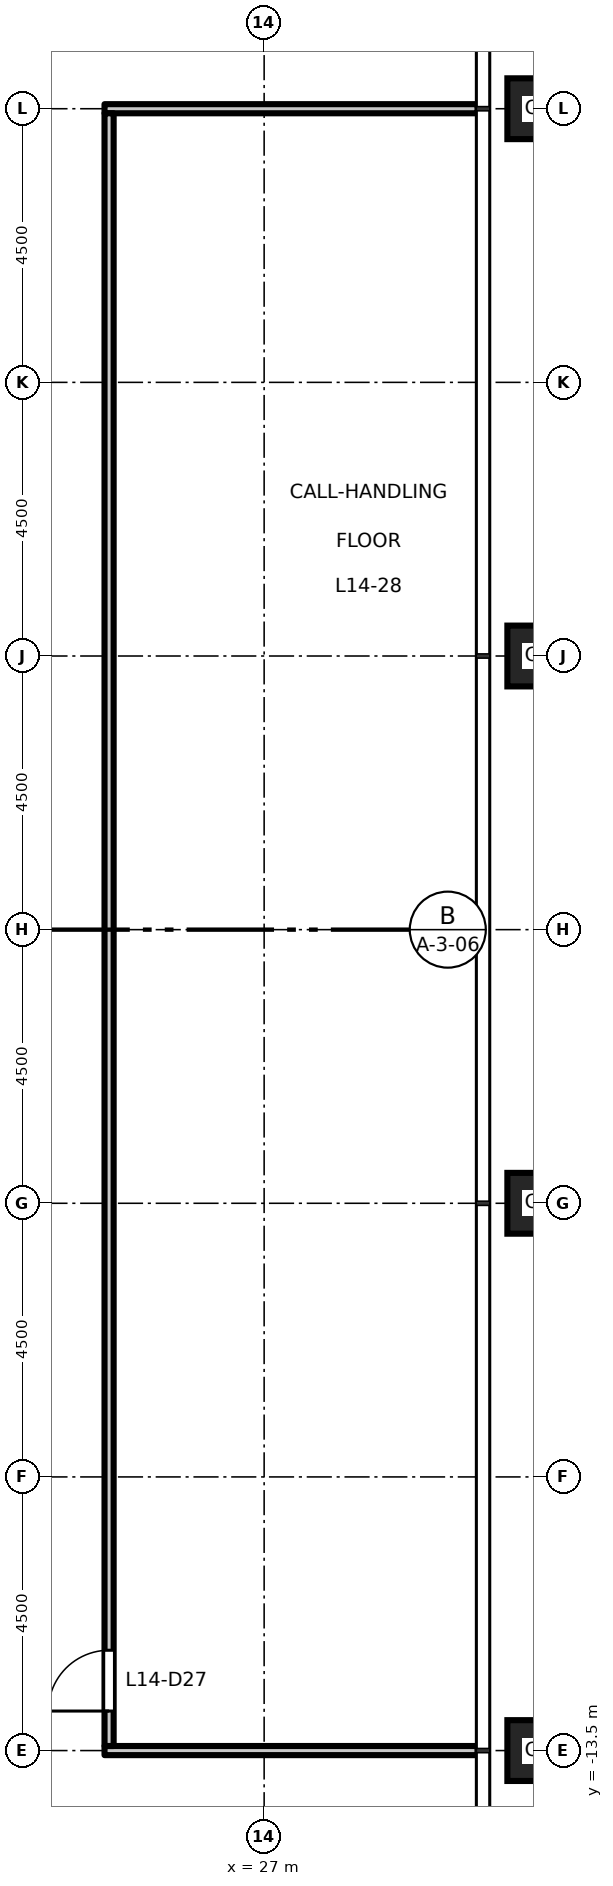
"""IFC4 building model, lengths in metres.
Left out: names, types, materials, properties, quantities, classifications, styles, units other than length and angle.
Written with IfcOpenShell. Run it as: python <this file> out.ifc"""

import sys

from ifc_helpers import new_model, si_unit, direction, frame, frame_2d, origin, origin_2d, place, context, subcontext, project, spatial, rectangle, hollow_rectangle, extrude, element, fill, save


model = new_model("IFC4")
c1 = context("Model", 3, precision=1e-05, world=origin(), true_north=direction((0.0, 1.0)))
c2 = subcontext(c1, "Body", "Model", "MODEL_VIEW")
j1 = project(units=[si_unit("LENGTHUNIT", "METRE"), si_unit("PLANEANGLEUNIT", "RADIAN")], contexts=[c1])
p1 = place(None, origin())
s1 = spatial("IfcSite", under=j1, at=p1, CompositionType="ELEMENT")
p2 = place(p1, origin())
s2 = spatial("IfcBuilding", under=s1, at=p2, CompositionType="ELEMENT")
p3 = place(p2, frame((0.0, 0.0, 67.2)))
s3 = spatial("IfcBuildingStorey", under=s2, at=p3, CompositionType="ELEMENT", Elevation=67.2)
for number, where, z_axis, x_axis in (
    (1, (31.5, -13.5, 0.0), (0.0, 0.0, 1.0), (1.0, 0.0, 0.0)),
    (2, (31.5, -4.5, 0.0), (0.0, 0.0, 1.0), (1.0, 0.0, 0.0)),
    (3, (31.5, 4.5, 0.0), (0.0, 0.0, 1.0), (1.0, 0.0, 0.0)),
    (4, (31.5, 13.5, 0.0), (0.0, 0.0, 1.0), (1.0, 0.0, 0.0)),
):
    element("IfcColumn", number, at=place(p3, frame(where, z_axis=z_axis, x_axis=x_axis)), inside=s3, PredefinedType="COLUMN", context=c2, shape_type="SweptSolid", body=[
        extrude(hollow_rectangle(XDim=1.0, YDim=1.0, WallThickness=0.06, at=origin_2d()), origin(), (0.0, 0.0, 1.0), 4.5),
    ])
for number, where, z_axis, x_axis in (
    (5, (24.375, -13.5, 0.0), (0.0, 0.0, 1.0), (1.0, 0.0, 0.0)),
    (6, (24.375, 13.5, 0.0), (0.0, 0.0, 1.0), (1.0, 0.0, 0.0)),
):
    element("IfcWall", number, at=place(p3, frame(where, z_axis=z_axis, x_axis=x_axis)), inside=s3, PredefinedType="PARTITIONING", context=c2, shape_type="SweptSolid", body=[
        extrude(rectangle(XDim=6.135, YDim=0.15, at=frame_2d((3.067, 0.0))), origin(), (0.0, 0.0, 1.0), 3.35),
    ])
p4 = place(p3, frame((24.45, -13.425, 0.0), z_axis=(0.0, 0.0, 1.0), x_axis=(0.0, 1.0, 0.0)))
e7 = element("IfcWall", 7, at=p4, inside=s3, PredefinedType="PARTITIONING", context=c2, shape_type="SweptSolid", body=[
    extrude(rectangle(XDim=26.85, YDim=0.15, at=frame_2d((13.425, 0.0))), origin(), (0.0, 0.0, 1.0), 4.35),
])
p5 = place(p4, frame((0.575, 0.0, 0.0)))
e8 = element("IfcOpeningElement", 8, at=p5, cuts=e7, PredefinedType="OPENING", context=c2, shape_type="SweptSolid", body=[
    extrude(rectangle(XDim=1.0, YDim=2.1, at=frame_2d((0.5, 1.05))), frame((0.0, 0.085, 0.0), z_axis=(0.0, -1.0, 0.0), x_axis=(1.0, 0.0, 0.0)), (0.0, 0.0, 1.0), 0.17),
])
p6 = place(p5, origin())
e9 = element("IfcDoor", 9, at=p6, inside=s3, OperationType="SINGLE_SWING_LEFT", PredefinedType="DOOR", context=c2, shape_type="SweptSolid", body=[
    extrude(rectangle(XDim=1.0, YDim=2.1, at=frame_2d((0.5, 1.05))), frame((0.0, 0.025, 0.0), z_axis=(0.0, -1.0, 0.0), x_axis=(1.0, 0.0, 0.0)), (0.0, 0.0, 1.0), 0.05),
])
fill(e8, e9)
save(model, sys.argv[1])
